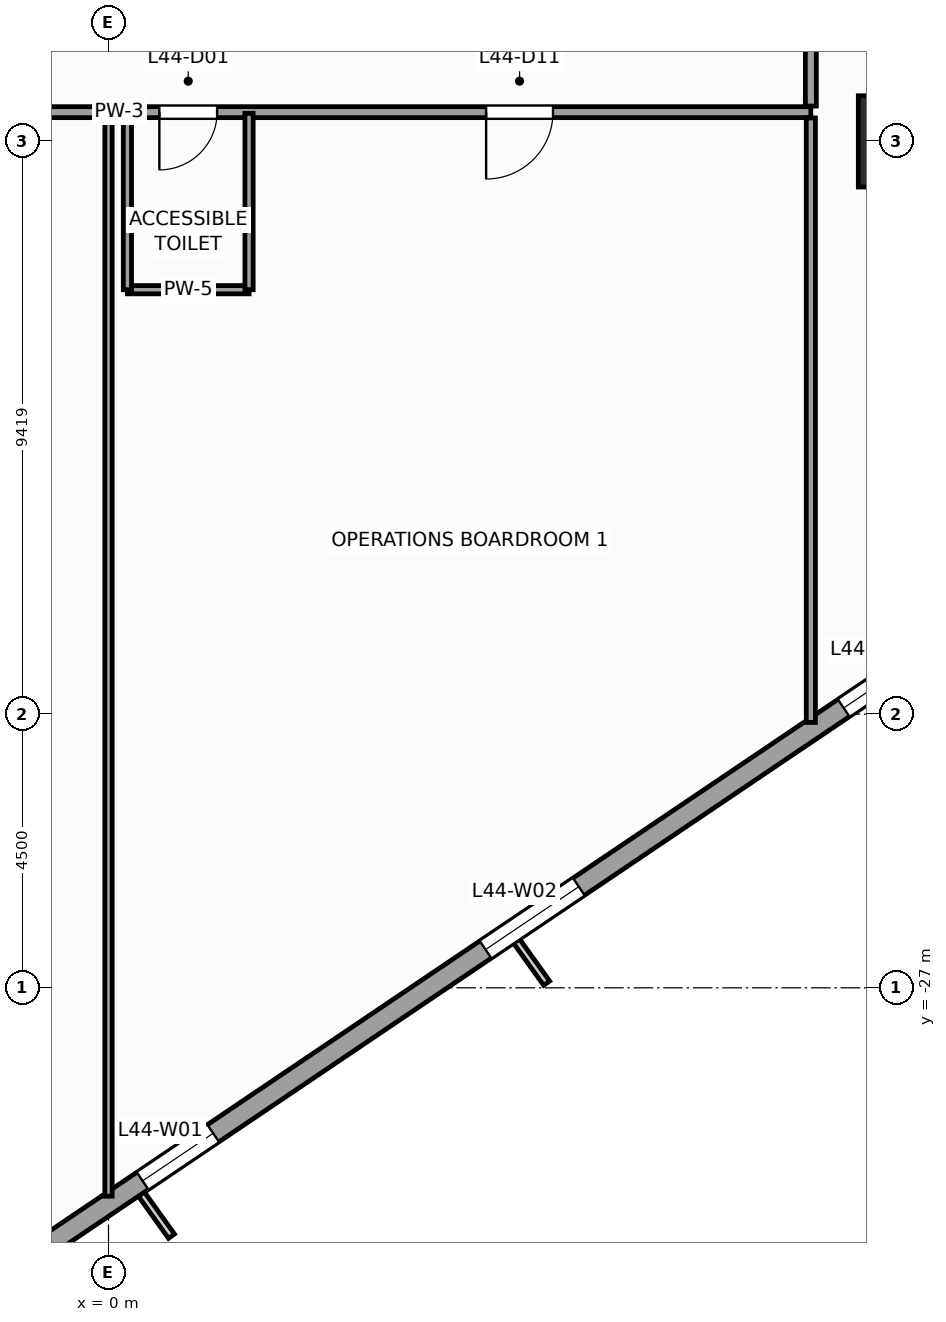
"""IFC4 building model, lengths in metres.
Left out: names, types, materials, properties, quantities, classifications, styles, units other than length and angle.
Written with IfcOpenShell. Run it as: python <this file> out.ifc"""

import sys

from ifc_helpers import new_model, si_unit, direction, frame, frame_2d, origin, origin_2d, place, context, subcontext, project, spatial, rectangle, extrude, source, transform, mapped, element, fill, save


model = new_model("IFC4")
c1 = context("Model", 3, precision=1e-05, world=origin(), true_north=direction((0.0, 1.0)))
c2 = subcontext(c1, "Body", "Model", "MODEL_VIEW")
j1 = project(units=[si_unit("LENGTHUNIT", "METRE"), si_unit("PLANEANGLEUNIT", "RADIAN")], contexts=[c1])
p1 = place(None, origin())
s1 = spatial("IfcSite", under=j1, at=p1, CompositionType="ELEMENT")
p2 = place(p1, origin())
s2 = spatial("IfcBuilding", under=s1, at=p2, CompositionType="ELEMENT")
p3 = place(p2, frame((0.0, 0.0, 184.4)))
s3 = spatial("IfcBuildingStorey", under=s2, at=p3, CompositionType="ELEMENT", Elevation=184.4)
m1 = source(origin(), c2, "Body", "SweptSolid", [
    extrude(rectangle(XDim=1.5, YDim=1.5, at=origin_2d()), origin(), (0.0, 0.0, 1.0), 4.0),
])
p4 = place(p3, frame((13.081, -13.081, 0.0), z_axis=(0.0, 0.0, 1.0), x_axis=(1.0, 0.0, 0.0)))
e1 = element("IfcColumn", 1, at=p4, inside=s3, PredefinedType="COLUMN", context=c2, shape_type="MappedRepresentation", body=[
    mapped(m1, transform((0.0, 0.0, 0.0), scale=1.0)),
])
p5 = place(p3, frame((-2.972, -32.558, 0.0), z_axis=(0.0, 0.0, 1.0), x_axis=(0.829036218961, 0.559194910251, 0.0)))
e2 = element("IfcWall", 2, at=p5, inside=s3, PredefinedType="STANDARD", context=c2, shape_type="SweptSolid", body=[
    extrude(rectangle(XDim=41.34, YDim=0.34, at=frame_2d((20.67, 0.0))), origin(), (0.0, 0.0, 1.0), 3.04),
])
p6 = place(p5, frame((25.745, 0.0, 0.0)))
e3 = element("IfcOpeningElement", 3, at=p6, cuts=e2, PredefinedType="OPENING", context=c2, shape_type="SweptSolid", body=[
    extrude(rectangle(XDim=1.05, YDim=2.25, at=frame_2d((0.525, 1.125))), frame((0.0, 0.18, 0.0), z_axis=(0.0, -1.0, 0.0), x_axis=(1.0, 0.0, 0.0)), (0.0, 0.0, 1.0), 0.36),
])
p7 = place(p5, frame((4.261, 0.0, 0.56)))
e4 = element("IfcOpeningElement", 4, at=p7, cuts=e2, PredefinedType="OPENING", context=c2, shape_type="SweptSolid", body=[
    extrude(rectangle(XDim=1.4, YDim=2.4, at=frame_2d((0.7, 1.2))), frame((0.0, 0.18, 0.0), z_axis=(0.0, -1.0, 0.0), x_axis=(1.0, 0.0, 0.0)), (0.0, 0.0, 1.0), 0.36),
])
p8 = place(p5, frame((11.064, 0.0, 0.61)))
e5 = element("IfcOpeningElement", 5, at=p8, cuts=e2, PredefinedType="OPENING", context=c2, shape_type="SweptSolid", body=[
    extrude(rectangle(XDim=1.85, YDim=2.35, at=frame_2d((0.925, 1.175))), frame((0.0, 0.18, 0.0), z_axis=(0.0, -1.0, 0.0), x_axis=(1.0, 0.0, 0.0)), (0.0, 0.0, 1.0), 0.36),
])
p9 = place(p5, frame((18.168, 0.0, 0.61)))
e6 = element("IfcOpeningElement", 6, at=p9, cuts=e2, PredefinedType="OPENING", context=c2, shape_type="SweptSolid", body=[
    extrude(rectangle(XDim=1.85, YDim=2.35, at=frame_2d((0.925, 1.175))), frame((0.0, 0.18, 0.0), z_axis=(0.0, -1.0, 0.0), x_axis=(1.0, 0.0, 0.0)), (0.0, 0.0, 1.0), 0.36),
])
p10 = place(p5, frame((27.936, 0.0, 0.61)))
e7 = element("IfcOpeningElement", 7, at=p10, cuts=e2, PredefinedType="OPENING", context=c2, shape_type="SweptSolid", body=[
    extrude(rectangle(XDim=1.85, YDim=2.35, at=frame_2d((0.925, 1.175))), frame((0.0, 0.18, 0.0), z_axis=(0.0, -1.0, 0.0), x_axis=(1.0, 0.0, 0.0)), (0.0, 0.0, 1.0), 0.36),
])
p11 = place(p5, frame((34.852, 0.0, 0.56)))
e8 = element("IfcOpeningElement", 8, at=p11, cuts=e2, PredefinedType="OPENING", context=c2, shape_type="SweptSolid", body=[
    extrude(rectangle(XDim=1.4, YDim=2.4, at=frame_2d((0.7, 1.2))), frame((0.0, 0.18, 0.0), z_axis=(0.0, -1.0, 0.0), x_axis=(1.0, 0.0, 0.0)), (0.0, 0.0, 1.0), 0.36),
])
p12 = place(p3, frame((-10.45, -12.6, 0.0), z_axis=(0.0, 0.0, 1.0), x_axis=(1.0, 0.0, 0.0)))
e9 = element("IfcWall", 9, at=p12, inside=s3, PredefinedType="PARTITIONING", context=c2, shape_type="SweptSolid", body=[
    extrude(rectangle(XDim=22.0, YDim=0.18, at=frame_2d((11.0, 0.0))), origin(), (0.0, 0.0, 1.0), 3.74),
])
p13 = place(p12, frame((11.286, 0.0, 0.0)))
e10 = element("IfcOpeningElement", 10, at=p13, cuts=e9, PredefinedType="OPENING", context=c2, shape_type="SweptSolid", body=[
    extrude(rectangle(XDim=0.95, YDim=2.1, at=frame_2d((0.475, 1.05))), frame((0.0, 0.1, 0.0), z_axis=(0.0, -1.0, 0.0), x_axis=(1.0, 0.0, 0.0)), (0.0, 0.0, 1.0), 0.2),
])
p14 = place(p12, frame((4.839, 0.0, 0.0)))
e11 = element("IfcOpeningElement", 11, at=p14, cuts=e9, PredefinedType="OPENING", context=c2, shape_type="SweptSolid", body=[
    extrude(rectangle(XDim=1.1, YDim=2.2, at=frame_2d((0.55, 1.1))), frame((0.0, 0.1, 0.0), z_axis=(0.0, -1.0, 0.0), x_axis=(1.0, 0.0, 0.0)), (0.0, 0.0, 1.0), 0.2),
])
p15 = place(p12, frame((16.66, 0.0, 0.0)))
e12 = element("IfcOpeningElement", 12, at=p15, cuts=e9, PredefinedType="OPENING", context=c2, shape_type="SweptSolid", body=[
    extrude(rectangle(XDim=1.1, YDim=2.2, at=frame_2d((0.55, 1.1))), frame((0.0, 0.1, 0.0), z_axis=(0.0, -1.0, 0.0), x_axis=(1.0, 0.0, 0.0)), (0.0, 0.0, 1.0), 0.2),
])
p16 = place(p3, frame((11.55, -12.5, 0.0), z_axis=(0.0, 0.0, 1.0), x_axis=(0.0, 1.0, 0.0)))
e13 = element("IfcWall", 13, at=p16, inside=s3, PredefinedType="PARTITIONING", context=c2, shape_type="SweptSolid", body=[
    extrude(rectangle(XDim=14.1, YDim=0.18, at=frame_2d((7.05, 0.0))), origin(), (0.0, 0.0, 1.0), 3.74),
])
p17 = place(p16, frame((9.539, 0.0, 0.0)))
e14 = element("IfcOpeningElement", 14, at=p17, cuts=e13, PredefinedType="OPENING", context=c2, shape_type="SweptSolid", body=[
    extrude(rectangle(XDim=0.95, YDim=2.1, at=frame_2d((0.475, 1.05))), frame((0.0, 0.1, 0.0), z_axis=(0.0, -1.0, 0.0), x_axis=(1.0, 0.0, 0.0)), (0.0, 0.0, 1.0), 0.2),
])
p18 = place(p16, frame((12.061, 0.0, 0.0)))
e15 = element("IfcOpeningElement", 15, at=p18, cuts=e13, PredefinedType="OPENING", context=c2, shape_type="SweptSolid", body=[
    extrude(rectangle(XDim=1.1, YDim=2.2, at=frame_2d((0.55, 1.1))), frame((0.0, 0.1, 0.0), z_axis=(0.0, -1.0, 0.0), x_axis=(1.0, 0.0, 0.0)), (0.0, 0.0, 1.0), 0.2),
])
p19 = place(p16, frame((4.065, 0.0, 0.0)))
e16 = element("IfcOpeningElement", 16, at=p19, cuts=e13, PredefinedType="OPENING", context=c2, shape_type="SweptSolid", body=[
    extrude(rectangle(XDim=1.1, YDim=2.2, at=frame_2d((0.55, 1.1))), frame((0.0, 0.1, 0.0), z_axis=(0.0, -1.0, 0.0), x_axis=(1.0, 0.0, 0.0)), (0.0, 0.0, 1.0), 0.2),
])
p20 = place(p3, frame((0.0, -30.427, 0.0), z_axis=(0.0, 0.0, 1.0), x_axis=(0.0, 1.0, 0.0)))
e17 = element("IfcWall", 17, at=p20, inside=s3, PredefinedType="PARTITIONING", context=c2, shape_type="SweptSolid", body=[
    extrude(rectangle(XDim=17.732, YDim=0.12, at=frame_2d((8.866, 0.0))), origin(), (0.0, 0.0, 1.0), 3.74),
])
p21 = place(p3, frame((11.55, -22.636, 0.0), z_axis=(0.0, 0.0, 1.0), x_axis=(0.0, 1.0, 0.0)))
e18 = element("IfcWall", 18, at=p21, inside=s3, PredefinedType="PARTITIONING", context=c2, shape_type="SweptSolid", body=[
    extrude(rectangle(XDim=9.941, YDim=0.15, at=frame_2d((4.971, 0.0))), origin(), (0.0, 0.0, 1.0), 3.74),
])
p22 = place(p3, frame((0.311, -15.52, 0.0), z_axis=(0.0, 0.0, 1.0), x_axis=(1.0, 0.0, 0.0)))
e19 = element("IfcWall", 19, at=p22, inside=s3, PredefinedType="PARTITIONING", context=c2, shape_type="SweptSolid", body=[
    extrude(rectangle(XDim=2.0, YDim=0.135, at=frame_2d((1.0, 0.0))), origin(), (0.0, 0.0, 1.0), 3.74),
])
for number, where, z_axis, x_axis in (
    (20, (2.311, -15.52, 0.0), (0.0, 0.0, 1.0), (0.0, 1.0, 0.0)),
    (21, (0.311, -15.52, 0.0), (0.0, 0.0, 1.0), (0.0, 1.0, 0.0)),
):
    element("IfcWall", number, at=place(p3, frame(where, z_axis=z_axis, x_axis=x_axis)), inside=s3, PredefinedType="PARTITIONING", context=c2, shape_type="SweptSolid", body=[
        extrude(rectangle(XDim=2.9, YDim=0.135, at=frame_2d((1.45, 0.0))), origin(), (0.0, 0.0, 1.0), 3.74),
    ])
m2 = source(origin(), c2, "Body", "SweptSolid", [
    extrude(rectangle(XDim=1.4, YDim=2.4, at=frame_2d((0.7, 1.2))), frame((0.0, 0.03, 0.0), z_axis=(0.0, -1.0, 0.0), x_axis=(1.0, 0.0, 0.0)), (0.0, 0.0, 1.0), 0.06),
])
p23 = place(p7, origin())
e22 = element("IfcWindow", 22, at=p23, inside=s3, PartitioningType="SINGLE_PANEL", PredefinedType="WINDOW", context=c2, shape_type="MappedRepresentation", body=[
    mapped(m2, transform((0.0, 0.0, 0.0), scale=1.0)),
])
fill(e4, e22)
m3 = source(origin(), c2, "Body", "SweptSolid", [
    extrude(rectangle(XDim=1.85, YDim=2.35, at=frame_2d((0.925, 1.175))), frame((0.0, 0.03, 0.0), z_axis=(0.0, -1.0, 0.0), x_axis=(1.0, 0.0, 0.0)), (0.0, 0.0, 1.0), 0.06),
])
p24 = place(p8, origin())
e23 = element("IfcWindow", 23, at=p24, inside=s3, PartitioningType="SINGLE_PANEL", PredefinedType="WINDOW", context=c2, shape_type="MappedRepresentation", body=[
    mapped(m3, transform((0.0, 0.0, 0.0), scale=1.0)),
])
fill(e5, e23)
p25 = place(p9, origin())
e24 = element("IfcWindow", 24, at=p25, inside=s3, PartitioningType="SINGLE_PANEL", PredefinedType="WINDOW", context=c2, shape_type="MappedRepresentation", body=[
    mapped(m3, transform((0.0, 0.0, 0.0), scale=1.0)),
])
fill(e6, e24)
m4 = source(origin(), c2, "Body", "SweptSolid", [
    extrude(rectangle(XDim=0.95, YDim=2.1, at=frame_2d((0.475, 1.05))), frame((0.0, 0.025, 0.0), z_axis=(0.0, -1.0, 0.0), x_axis=(1.0, 0.0, 0.0)), (0.0, 0.0, 1.0), 0.05),
])
p26 = place(p13, frame((0.95, 0.0, 0.0), z_axis=(0.0, 0.0, 1.0), x_axis=(-1.0, 0.0, 0.0)))
e25 = element("IfcDoor", 25, at=p26, inside=s3, OperationType="SINGLE_SWING_LEFT", PredefinedType="DOOR", context=c2, shape_type="MappedRepresentation", body=[
    mapped(m4, transform((0.0, 0.0, 0.0), scale=1.0)),
])
fill(e10, e25)
m5 = source(origin(), c2, "Body", "SweptSolid", [
    extrude(rectangle(XDim=1.1, YDim=2.2, at=frame_2d((0.55, 1.1))), frame((0.0, 0.025, 0.0), z_axis=(0.0, -1.0, 0.0), x_axis=(1.0, 0.0, 0.0)), (0.0, 0.0, 1.0), 0.05),
])
p27 = place(p15, frame((1.1, 0.0, 0.0), z_axis=(0.0, 0.0, 1.0), x_axis=(-1.0, 0.0, 0.0)))
e26 = element("IfcDoor", 26, at=p27, inside=s3, OperationType="SINGLE_SWING_LEFT", PredefinedType="DOOR", context=c2, shape_type="MappedRepresentation", body=[
    mapped(m5, transform((0.0, 0.0, 0.0), scale=1.0)),
])
fill(e12, e26)
save(model, sys.argv[1])
